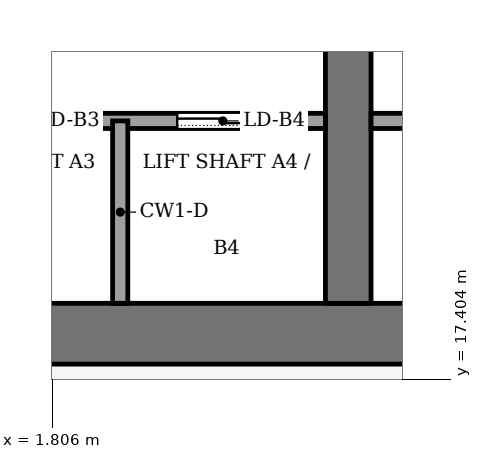
"""IFC4 building model, lengths in metres.
Left out: names, types, materials, properties, quantities, classifications, styles, units other than length and angle.
Written with IfcOpenShell. Run it as: python <this file> out.ifc"""

import sys

from ifc_helpers import new_model, si_unit, direction, frame, frame_2d, origin, place, context, subcontext, project, spatial, rectangle, extrude, element, fill, save


model = new_model("IFC4")
c1 = context("Model", 3, precision=1e-05, world=origin(), true_north=direction((0.0, 1.0)))
c2 = subcontext(c1, "Body", "Model", "MODEL_VIEW")
j1 = project(units=[si_unit("LENGTHUNIT", "METRE"), si_unit("PLANEANGLEUNIT", "RADIAN")], contexts=[c1])
p1 = place(None, origin())
s1 = spatial("IfcSite", under=j1, at=p1, CompositionType="ELEMENT")
p2 = place(p1, origin())
s2 = spatial("IfcBuilding", under=s1, at=p2, CompositionType="ELEMENT")
p3 = place(p2, frame((0.0, 0.0, 233.0)))
s3 = spatial("IfcBuildingStorey", under=s2, at=p3, CompositionType="ELEMENT", Elevation=233.0)
p4 = place(p3, frame((-13.4, 18.0, -0.13), z_axis=(0.0, 0.0, 1.0), x_axis=(1.0, 0.0, 0.0)))
e1 = element("IfcWall", 1, at=p4, inside=s3, PredefinedType="SHEAR", context=c2, shape_type="SweptSolid", body=[
    extrude(rectangle(XDim=26.8, YDim=0.8, at=frame_2d((13.4, 0.0))), origin(), (0.0, 0.0, 1.0), 5.0),
])
p5 = place(p3, frame((5.7, 18.4, -0.13), z_axis=(0.0, 0.0, 1.0), x_axis=(0.0, 1.0, 0.0)))
e2 = element("IfcWall", 2, at=p5, inside=s3, PredefinedType="SHEAR", context=c2, shape_type="SweptSolid", body=[
    extrude(rectangle(XDim=19.2, YDim=0.6, at=frame_2d((9.6, 0.0))), origin(), (0.0, 0.0, 1.0), 5.0),
])
p6 = place(p5, frame((13.3, 0.0, 0.13)))
e3 = element("IfcOpeningElement", 3, at=p6, cuts=e2, PredefinedType="OPENING", context=c2, shape_type="SweptSolid", body=[
    extrude(rectangle(XDim=2.4, YDim=2.4, at=frame_2d((1.2, 1.2))), frame((0.0, 0.31, 0.0), z_axis=(0.0, -1.0, 0.0), x_axis=(1.0, 0.0, 0.0)), (0.0, 0.0, 1.0), 0.62),
])
p7 = place(p3, frame((-5.4, 20.8, 0.0), z_axis=(0.0, 0.0, 1.0), x_axis=(1.0, 0.0, 0.0)))
e4 = element("IfcWall", 4, at=p7, inside=s3, PredefinedType="PARTITIONING", context=c2, shape_type="SweptSolid", body=[
    extrude(rectangle(XDim=10.8, YDim=0.2, at=frame_2d((5.4, 0.0))), origin(), (0.0, 0.0, 1.0), 4.87),
])
p8 = place(p7, frame((0.75, 0.0, 0.0)))
e5 = element("IfcOpeningElement", 5, at=p8, cuts=e4, PredefinedType="OPENING", context=c2, shape_type="SweptSolid", body=[
    extrude(rectangle(XDim=1.2, YDim=2.2, at=frame_2d((0.6, 1.1))), frame((0.0, 0.11, 0.0), z_axis=(0.0, -1.0, 0.0), x_axis=(1.0, 0.0, 0.0)), (0.0, 0.0, 1.0), 0.22),
])
p9 = place(p7, frame((3.45, 0.0, 0.0)))
e6 = element("IfcOpeningElement", 6, at=p9, cuts=e4, PredefinedType="OPENING", context=c2, shape_type="SweptSolid", body=[
    extrude(rectangle(XDim=1.2, YDim=2.2, at=frame_2d((0.6, 1.1))), frame((0.0, 0.11, 0.0), z_axis=(0.0, -1.0, 0.0), x_axis=(1.0, 0.0, 0.0)), (0.0, 0.0, 1.0), 0.22),
])
p10 = place(p7, frame((6.15, 0.0, 0.0)))
e7 = element("IfcOpeningElement", 7, at=p10, cuts=e4, PredefinedType="OPENING", context=c2, shape_type="SweptSolid", body=[
    extrude(rectangle(XDim=1.2, YDim=2.2, at=frame_2d((0.6, 1.1))), frame((0.0, 0.11, 0.0), z_axis=(0.0, -1.0, 0.0), x_axis=(1.0, 0.0, 0.0)), (0.0, 0.0, 1.0), 0.22),
])
p11 = place(p7, frame((8.85, 0.0, 0.0)))
e8 = element("IfcOpeningElement", 8, at=p11, cuts=e4, PredefinedType="OPENING", context=c2, shape_type="SweptSolid", body=[
    extrude(rectangle(XDim=1.2, YDim=2.2, at=frame_2d((0.6, 1.1))), frame((0.0, 0.11, 0.0), z_axis=(0.0, -1.0, 0.0), x_axis=(1.0, 0.0, 0.0)), (0.0, 0.0, 1.0), 0.22),
])
p12 = place(p3, frame((6.0, 20.8, 0.0), z_axis=(0.0, 0.0, 1.0), x_axis=(1.0, 0.0, 0.0)))
e9 = element("IfcWall", 9, at=p12, inside=s3, PredefinedType="PARTITIONING", context=c2, shape_type="SweptSolid", body=[
    extrude(rectangle(XDim=6.6, YDim=0.2, at=frame_2d((3.3, 0.0))), origin(), (0.0, 0.0, 1.0), 4.87),
])
p13 = place(p12, frame((2.8, 0.0, 0.0)))
e10 = element("IfcOpeningElement", 10, at=p13, cuts=e9, PredefinedType="OPENING", context=c2, shape_type="SweptSolid", body=[
    extrude(rectangle(XDim=1.0, YDim=2.1, at=frame_2d((0.5, 1.05))), frame((0.0, 0.11, 0.0), z_axis=(0.0, -1.0, 0.0), x_axis=(1.0, 0.0, 0.0)), (0.0, 0.0, 1.0), 0.22),
])
p14 = place(p3, frame((2.7, 18.4, 0.0), z_axis=(0.0, 0.0, 1.0), x_axis=(0.0, 1.0, 0.0)))
e11 = element("IfcWall", 11, at=p14, inside=s3, PredefinedType="PARTITIONING", context=c2, shape_type="SweptSolid", body=[
    extrude(rectangle(XDim=2.4, YDim=0.2, at=frame_2d((1.2, 0.0))), origin(), (0.0, 0.0, 1.0), 4.87),
])
p15 = place(p10, origin())
e12 = element("IfcDoor", 12, at=p15, inside=s3, OperationType="SLIDING_TO_LEFT", PredefinedType="DOOR", context=c2, shape_type="SweptSolid", body=[
    extrude(rectangle(XDim=1.2, YDim=2.2, at=frame_2d((0.6, 1.1))), frame((0.0, 0.025, 0.0), z_axis=(0.0, -1.0, 0.0), x_axis=(1.0, 0.0, 0.0)), (0.0, 0.0, 1.0), 0.05),
])
fill(e7, e12)
p16 = place(p11, origin())
e13 = element("IfcDoor", 13, at=p16, inside=s3, OperationType="SLIDING_TO_LEFT", PredefinedType="DOOR", context=c2, shape_type="SweptSolid", body=[
    extrude(rectangle(XDim=1.2, YDim=2.2, at=frame_2d((0.6, 1.1))), frame((0.0, 0.025, 0.0), z_axis=(0.0, -1.0, 0.0), x_axis=(1.0, 0.0, 0.0)), (0.0, 0.0, 1.0), 0.05),
])
fill(e8, e13)
save(model, sys.argv[1])
